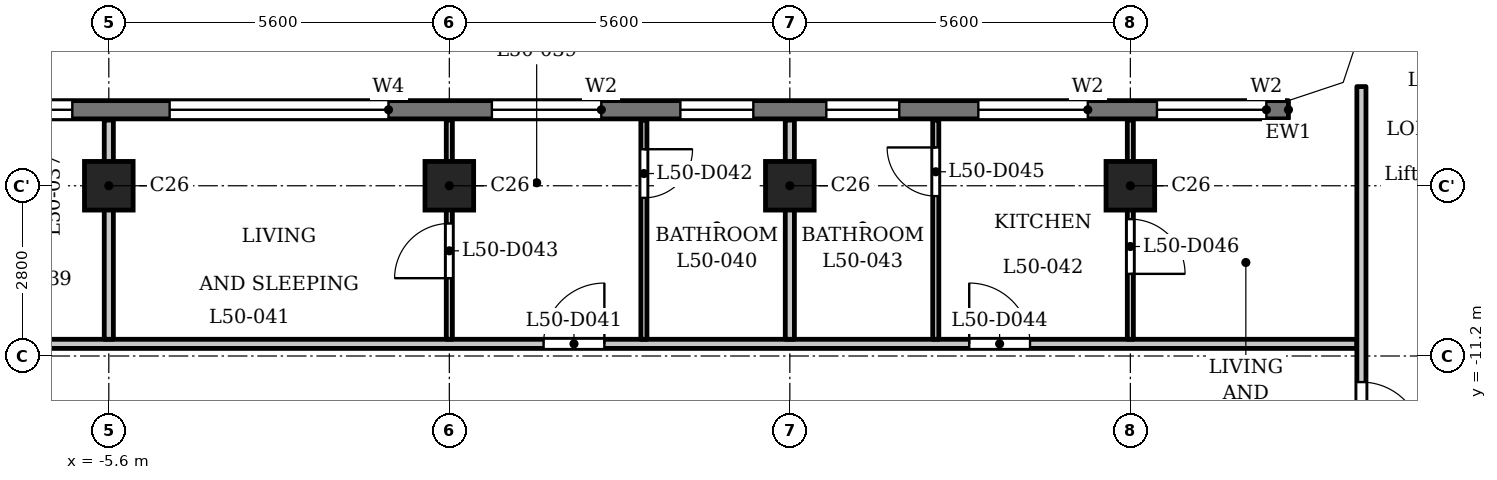
"""IFC4 building model, lengths in metres.
Left out: names, types, materials, properties, quantities, classifications, styles, units other than length and angle.
Written with IfcOpenShell. Run it as: python <this file> out.ifc"""

import sys

from ifc_helpers import new_model, si_unit, direction, frame, frame_2d, origin, origin_2d, place, context, subcontext, project, spatial, polyline, rectangle, outline, extrude, element, fill, save


model = new_model("IFC4")
c1 = context("Model", 3, precision=1e-05, world=origin(), true_north=direction((0.0, 1.0)))
c2 = subcontext(c1, "Body", "Model", "MODEL_VIEW")
j1 = project(units=[si_unit("LENGTHUNIT", "METRE"), si_unit("PLANEANGLEUNIT", "RADIAN")], contexts=[c1])
p1 = place(None, origin())
s1 = spatial("IfcSite", under=j1, at=p1, CompositionType="ELEMENT")
p2 = place(p1, origin())
s2 = spatial("IfcBuilding", under=s1, at=p2, CompositionType="ELEMENT")
p3 = place(p2, frame((0.0, 0.0, 195.9)))
s3 = spatial("IfcBuildingStorey", under=s2, at=p3, CompositionType="ELEMENT", Elevation=195.9)
for number, where, z_axis, x_axis in (
    (1, (-5.6, -8.4, 0.0), (0.0, 0.0, 1.0), (1.0, 0.0, 0.0)),
    (2, (0.0, -8.4, 0.0), (0.0, 0.0, 1.0), (1.0, 0.0, 0.0)),
    (3, (5.6, -8.4, 0.0), (0.0, 0.0, 1.0), (1.0, 0.0, 0.0)),
    (4, (11.2, -8.4, 0.0), (0.0, 0.0, 1.0), (1.0, 0.0, 0.0)),
):
    element("IfcColumn", number, at=place(p3, frame(where, z_axis=z_axis, x_axis=x_axis)), inside=s3, PredefinedType="COLUMN", context=c2, shape_type="SweptSolid", body=[
        extrude(rectangle(XDim=0.8, YDim=0.8, at=origin_2d()), origin(), (0.0, 0.0, 1.0), 3.5),
    ])
p4 = place(p3, frame((13.8, -7.15, 0.0), z_axis=(0.0, 0.0, 1.0), x_axis=(-1.0, 0.0, 0.0)))
e5 = element("IfcWall", 5, at=p4, inside=s3, PredefinedType="SOLIDWALL", context=c2, shape_type="SweptSolid", body=[
    extrude(rectangle(XDim=27.6, YDim=0.3, at=frame_2d((13.8, 0.0))), origin(), (0.0, 0.0, 1.0), 3.2),
])
p5 = place(p4, frame((0.363, 0.0, 0.9)))
e6 = element("IfcOpeningElement", 6, at=p5, cuts=e5, PredefinedType="OPENING", context=c2, shape_type="SweptSolid", body=[
    extrude(rectangle(XDim=1.8, YDim=1.25, at=frame_2d((0.9, 0.625))), frame((0.0, 0.16, 0.0), z_axis=(0.0, -1.0, 0.0), x_axis=(1.0, 0.0, 0.0)), (0.0, 0.0, 1.0), 0.32),
])
p6 = place(p4, frame((3.3, 0.0, 0.9)))
e7 = element("IfcOpeningElement", 7, at=p6, cuts=e5, PredefinedType="OPENING", context=c2, shape_type="SweptSolid", body=[
    extrude(rectangle(XDim=1.8, YDim=1.25, at=frame_2d((0.9, 0.625))), frame((0.0, 0.16, 0.0), z_axis=(0.0, -1.0, 0.0), x_axis=(1.0, 0.0, 0.0)), (0.0, 0.0, 1.0), 0.32),
])
p7 = place(p4, frame((6.4, 0.0, 0.6)))
e8 = element("IfcOpeningElement", 8, at=p7, cuts=e5, PredefinedType="OPENING", context=c2, shape_type="SweptSolid", body=[
    extrude(rectangle(XDim=1.2, YDim=1.55, at=frame_2d((0.6, 0.775))), frame((0.0, 0.16, 0.0), z_axis=(0.0, -1.0, 0.0), x_axis=(1.0, 0.0, 0.0)), (0.0, 0.0, 1.0), 0.32),
])
p8 = place(p4, frame((8.8, 0.0, 0.6)))
e9 = element("IfcOpeningElement", 9, at=p8, cuts=e5, PredefinedType="OPENING", context=c2, shape_type="SweptSolid", body=[
    extrude(rectangle(XDim=1.2, YDim=1.55, at=frame_2d((0.6, 0.775))), frame((0.0, 0.16, 0.0), z_axis=(0.0, -1.0, 0.0), x_axis=(1.0, 0.0, 0.0)), (0.0, 0.0, 1.0), 0.32),
])
p9 = place(p4, frame((11.3, 0.0, 0.9)))
e10 = element("IfcOpeningElement", 10, at=p9, cuts=e5, PredefinedType="OPENING", context=c2, shape_type="SweptSolid", body=[
    extrude(rectangle(XDim=1.8, YDim=1.25, at=frame_2d((0.9, 0.625))), frame((0.0, 0.16, 0.0), z_axis=(0.0, -1.0, 0.0), x_axis=(1.0, 0.0, 0.0)), (0.0, 0.0, 1.0), 0.32),
])
p10 = place(p4, frame((14.8, 0.0, 1.2)))
e11 = element("IfcOpeningElement", 11, at=p10, cuts=e5, PredefinedType="OPENING", context=c2, shape_type="SweptSolid", body=[
    extrude(rectangle(XDim=3.6, YDim=0.95, at=frame_2d((1.8, 0.475))), frame((0.0, 0.16, 0.0), z_axis=(0.0, -1.0, 0.0), x_axis=(1.0, 0.0, 0.0)), (0.0, 0.0, 1.0), 0.32),
])
p11 = place(p4, frame((20.0, 0.0, 0.6)))
e12 = element("IfcOpeningElement", 12, at=p11, cuts=e5, PredefinedType="OPENING", context=c2, shape_type="SweptSolid", body=[
    extrude(rectangle(XDim=1.2, YDim=1.55, at=frame_2d((0.6, 0.775))), frame((0.0, 0.16, 0.0), z_axis=(0.0, -1.0, 0.0), x_axis=(1.0, 0.0, 0.0)), (0.0, 0.0, 1.0), 0.32),
])
p12 = place(p4, frame((22.5, 0.0, 0.9)))
e13 = element("IfcOpeningElement", 13, at=p12, cuts=e5, PredefinedType="OPENING", context=c2, shape_type="SweptSolid", body=[
    extrude(rectangle(XDim=1.8, YDim=1.25, at=frame_2d((0.9, 0.625))), frame((0.0, 0.16, 0.0), z_axis=(0.0, -1.0, 0.0), x_axis=(1.0, 0.0, 0.0)), (0.0, 0.0, 1.0), 0.32),
])
p13 = place(p4, frame((25.438, 0.0, 0.9)))
e14 = element("IfcOpeningElement", 14, at=p13, cuts=e5, PredefinedType="OPENING", context=c2, shape_type="SweptSolid", body=[
    extrude(rectangle(XDim=1.8, YDim=1.25, at=frame_2d((0.9, 0.625))), frame((0.0, 0.16, 0.0), z_axis=(0.0, -1.0, 0.0), x_axis=(1.0, 0.0, 0.0)), (0.0, 0.0, 1.0), 0.32),
])
p14 = place(p3, frame((-14.925, -11.0, 0.0), z_axis=(0.0, 0.0, 1.0), x_axis=(1.0, 0.0, 0.0)))
e15 = element("IfcWall", 15, at=p14, inside=s3, PredefinedType="PARTITIONING", context=c2, shape_type="SweptSolid", body=[
    extrude(rectangle(XDim=29.85, YDim=0.15, at=frame_2d((14.925, 0.0))), origin(), (0.0, 0.0, 1.0), 3.2),
])
p15 = place(p14, frame((4.275, 0.0, 0.0)))
e16 = element("IfcOpeningElement", 16, at=p15, cuts=e15, PredefinedType="OPENING", context=c2, shape_type="SweptSolid", body=[
    extrude(rectangle(XDim=1.0, YDim=2.1, at=frame_2d((0.5, 1.05))), frame((0.0, 0.085, 0.0), z_axis=(0.0, -1.0, 0.0), x_axis=(1.0, 0.0, 0.0)), (0.0, 0.0, 1.0), 0.17),
])
p16 = place(p14, frame((16.475, 0.0, 0.0)))
e17 = element("IfcOpeningElement", 17, at=p16, cuts=e15, PredefinedType="OPENING", context=c2, shape_type="SweptSolid", body=[
    extrude(rectangle(XDim=1.0, YDim=2.1, at=frame_2d((0.5, 1.05))), frame((0.0, 0.085, 0.0), z_axis=(0.0, -1.0, 0.0), x_axis=(1.0, 0.0, 0.0)), (0.0, 0.0, 1.0), 0.17),
])
p17 = place(p14, frame((23.475, 0.0, 0.0)))
e18 = element("IfcOpeningElement", 18, at=p17, cuts=e15, PredefinedType="OPENING", context=c2, shape_type="SweptSolid", body=[
    extrude(rectangle(XDim=1.0, YDim=2.1, at=frame_2d((0.5, 1.05))), frame((0.0, 0.085, 0.0), z_axis=(0.0, -1.0, 0.0), x_axis=(1.0, 0.0, 0.0)), (0.0, 0.0, 1.0), 0.17),
])
p18 = place(p3, frame((-5.6, -10.925, 0.0), z_axis=(0.0, 0.0, 1.0), x_axis=(0.0, 1.0, 0.0)))
e19 = element("IfcWall", 19, at=p18, inside=s3, PredefinedType="PARTITIONING", context=c2, shape_type="SweptSolid", body=[
    extrude(rectangle(XDim=3.605, YDim=0.15, at=frame_2d((1.802, 0.0))), origin(), (0.0, 0.0, 1.0), 3.2),
])
p19 = place(p3, frame((0.0, -10.925, 0.0), z_axis=(0.0, 0.0, 1.0), x_axis=(0.0, 1.0, 0.0)))
e20 = element("IfcWall", 20, at=p19, inside=s3, PredefinedType="PARTITIONING", context=c2, shape_type="SweptSolid", body=[
    extrude(rectangle(XDim=3.605, YDim=0.1, at=frame_2d((1.802, 0.0))), origin(), (0.0, 0.0, 1.0), 3.2),
])
p20 = place(p19, frame((1.005, 0.0, 0.0)))
e21 = element("IfcOpeningElement", 21, at=p20, cuts=e20, PredefinedType="OPENING", context=c2, shape_type="SweptSolid", body=[
    extrude(rectangle(XDim=0.9, YDim=2.1, at=frame_2d((0.45, 1.05))), frame((0.0, 0.06, 0.0), z_axis=(0.0, -1.0, 0.0), x_axis=(1.0, 0.0, 0.0)), (0.0, 0.0, 1.0), 0.12),
])
p21 = place(p3, frame((3.2, -10.925, 0.0), z_axis=(0.0, 0.0, 1.0), x_axis=(0.0, 1.0, 0.0)))
e22 = element("IfcWall", 22, at=p21, inside=s3, PredefinedType="PARTITIONING", context=c2, shape_type="SweptSolid", body=[
    extrude(rectangle(XDim=3.605, YDim=0.1, at=frame_2d((1.802, 0.0))), origin(), (0.0, 0.0, 1.0), 3.2),
])
p22 = place(p21, frame((2.326, 0.0, 0.0)))
e23 = element("IfcOpeningElement", 23, at=p22, cuts=e22, PredefinedType="OPENING", context=c2, shape_type="SweptSolid", body=[
    extrude(rectangle(XDim=0.8, YDim=2.1, at=frame_2d((0.4, 1.05))), frame((0.0, 0.06, 0.0), z_axis=(0.0, -1.0, 0.0), x_axis=(1.0, 0.0, 0.0)), (0.0, 0.0, 1.0), 0.12),
])
p23 = place(p3, frame((5.6, -10.925, 0.0), z_axis=(0.0, 0.0, 1.0), x_axis=(0.0, 1.0, 0.0)))
e24 = element("IfcWall", 24, at=p23, inside=s3, PredefinedType="PARTITIONING", context=c2, shape_type="SweptSolid", body=[
    extrude(rectangle(XDim=3.605, YDim=0.15, at=frame_2d((1.802, 0.0))), origin(), (0.0, 0.0, 1.0), 3.2),
])
p24 = place(p3, frame((8.0, -10.925, 0.0), z_axis=(0.0, 0.0, 1.0), x_axis=(0.0, 1.0, 0.0)))
e25 = element("IfcWall", 25, at=p24, inside=s3, PredefinedType="PARTITIONING", context=c2, shape_type="SweptSolid", body=[
    extrude(rectangle(XDim=3.605, YDim=0.1, at=frame_2d((1.802, 0.0))), origin(), (0.0, 0.0, 1.0), 3.2),
])
p25 = place(p24, frame((2.355, 0.0, 0.0)))
e26 = element("IfcOpeningElement", 26, at=p25, cuts=e25, PredefinedType="OPENING", context=c2, shape_type="SweptSolid", body=[
    extrude(rectangle(XDim=0.8, YDim=2.1, at=frame_2d((0.4, 1.05))), frame((0.0, 0.06, 0.0), z_axis=(0.0, -1.0, 0.0), x_axis=(1.0, 0.0, 0.0)), (0.0, 0.0, 1.0), 0.12),
])
p26 = place(p3, frame((11.2, -10.925, 0.0), z_axis=(0.0, 0.0, 1.0), x_axis=(0.0, 1.0, 0.0)))
e27 = element("IfcWall", 27, at=p26, inside=s3, PredefinedType="PARTITIONING", context=c2, shape_type="SweptSolid", body=[
    extrude(rectangle(XDim=3.605, YDim=0.1, at=frame_2d((1.802, 0.0))), origin(), (0.0, 0.0, 1.0), 3.2),
])
p27 = place(p26, frame((1.076, 0.0, 0.0)))
e28 = element("IfcOpeningElement", 28, at=p27, cuts=e27, PredefinedType="OPENING", context=c2, shape_type="SweptSolid", body=[
    extrude(rectangle(XDim=0.9, YDim=2.1, at=frame_2d((0.45, 1.05))), frame((0.0, 0.06, 0.0), z_axis=(0.0, -1.0, 0.0), x_axis=(1.0, 0.0, 0.0)), (0.0, 0.0, 1.0), 0.12),
])
p28 = place(p3, frame((15.0, -13.125, 0.0), z_axis=(0.0, 0.0, 1.0), x_axis=(0.0, 1.0, 0.0)))
e29 = element("IfcWall", 29, at=p28, inside=s3, PredefinedType="PARTITIONING", context=c2, shape_type="SweptSolid", body=[
    extrude(rectangle(XDim=6.356, YDim=0.15, at=frame_2d((3.178, 0.0))), origin(), (0.0, 0.0, 1.0), 3.2),
])
p29 = place(p28, frame((0.496, 0.0, 0.0)))
e30 = element("IfcOpeningElement", 30, at=p29, cuts=e29, PredefinedType="OPENING", context=c2, shape_type="SweptSolid", body=[
    extrude(rectangle(XDim=1.0, YDim=2.1, at=frame_2d((0.5, 1.05))), frame((0.0, 0.085, 0.0), z_axis=(0.0, -1.0, 0.0), x_axis=(1.0, 0.0, 0.0)), (0.0, 0.0, 1.0), 0.17),
])
p30 = place(p3, origin())
e31 = element("IfcWall", 31, at=p30, inside=s3, PredefinedType="SOLIDWALL", context=c2, shape_type="SweptSolid", body=[
    extrude(outline(polyline([(14.937, -6.937), (15.3, -5.849), (15.3, -5.8), (15.0, -5.8), (14.7, -6.7), (13.8, -7.0), (13.8, -7.3), (13.849, -7.3), (14.937, -6.937)])), origin(), (0.0, 0.0, 1.0), 3.2),
])
p31 = place(p29, origin())
e32 = element("IfcDoor", 32, at=p31, inside=s3, OperationType="SINGLE_SWING_LEFT", PredefinedType="DOOR", context=c2, shape_type="SweptSolid", body=[
    extrude(rectangle(XDim=1.0, YDim=2.1, at=frame_2d((0.5, 1.05))), frame((0.0, 0.025, 0.0), z_axis=(0.0, -1.0, 0.0), x_axis=(1.0, 0.0, 0.0)), (0.0, 0.0, 1.0), 0.05),
])
fill(e30, e32)
p32 = place(p16, origin())
e33 = element("IfcDoor", 33, at=p32, inside=s3, OperationType="SINGLE_SWING_LEFT", PredefinedType="DOOR", context=c2, shape_type="SweptSolid", body=[
    extrude(rectangle(XDim=1.0, YDim=2.1, at=frame_2d((0.5, 1.05))), frame((0.0, 0.025, 0.0), z_axis=(0.0, -1.0, 0.0), x_axis=(1.0, 0.0, 0.0)), (0.0, 0.0, 1.0), 0.05),
])
fill(e17, e33)
p33 = place(p22, origin())
e34 = element("IfcDoor", 34, at=p33, inside=s3, OperationType="SINGLE_SWING_RIGHT", PredefinedType="DOOR", context=c2, shape_type="SweptSolid", body=[
    extrude(rectangle(XDim=0.8, YDim=2.1, at=frame_2d((0.4, 1.05))), frame((0.0, 0.025, 0.0), z_axis=(0.0, -1.0, 0.0), x_axis=(1.0, 0.0, 0.0)), (0.0, 0.0, 1.0), 0.05),
])
fill(e23, e34)
p34 = place(p20, origin())
e35 = element("IfcDoor", 35, at=p34, inside=s3, OperationType="SINGLE_SWING_RIGHT", PredefinedType="DOOR", context=c2, shape_type="SweptSolid", body=[
    extrude(rectangle(XDim=0.9, YDim=2.1, at=frame_2d((0.45, 1.05))), frame((0.0, 0.025, 0.0), z_axis=(0.0, -1.0, 0.0), x_axis=(1.0, 0.0, 0.0)), (0.0, 0.0, 1.0), 0.05),
])
fill(e21, e35)
p35 = place(p17, origin())
e36 = element("IfcDoor", 36, at=p35, inside=s3, OperationType="SINGLE_SWING_RIGHT", PredefinedType="DOOR", context=c2, shape_type="SweptSolid", body=[
    extrude(rectangle(XDim=1.0, YDim=2.1, at=frame_2d((0.5, 1.05))), frame((0.0, 0.025, 0.0), z_axis=(0.0, -1.0, 0.0), x_axis=(1.0, 0.0, 0.0)), (0.0, 0.0, 1.0), 0.05),
])
fill(e18, e36)
p36 = place(p25, origin())
e37 = element("IfcDoor", 37, at=p36, inside=s3, OperationType="SINGLE_SWING_LEFT", PredefinedType="DOOR", context=c2, shape_type="SweptSolid", body=[
    extrude(rectangle(XDim=0.8, YDim=2.1, at=frame_2d((0.4, 1.05))), frame((0.0, 0.025, 0.0), z_axis=(0.0, -1.0, 0.0), x_axis=(1.0, 0.0, 0.0)), (0.0, 0.0, 1.0), 0.05),
])
fill(e26, e37)
p37 = place(p27, origin())
e38 = element("IfcDoor", 38, at=p37, inside=s3, OperationType="SINGLE_SWING_LEFT", PredefinedType="DOOR", context=c2, shape_type="SweptSolid", body=[
    extrude(rectangle(XDim=0.9, YDim=2.1, at=frame_2d((0.45, 1.05))), frame((0.0, 0.025, 0.0), z_axis=(0.0, -1.0, 0.0), x_axis=(1.0, 0.0, 0.0)), (0.0, 0.0, 1.0), 0.05),
])
fill(e28, e38)
p38 = place(p5, origin())
e39 = element("IfcWindow", 39, at=p38, inside=s3, PartitioningType="SINGLE_PANEL", PredefinedType="WINDOW", context=c2, shape_type="SweptSolid", body=[
    extrude(rectangle(XDim=1.8, YDim=1.25, at=frame_2d((0.9, 0.625))), frame((0.0, 0.03, 0.0), z_axis=(0.0, -1.0, 0.0), x_axis=(1.0, 0.0, 0.0)), (0.0, 0.0, 1.0), 0.06),
])
fill(e6, e39)
p39 = place(p6, origin())
e40 = element("IfcWindow", 40, at=p39, inside=s3, PartitioningType="SINGLE_PANEL", PredefinedType="WINDOW", context=c2, shape_type="SweptSolid", body=[
    extrude(rectangle(XDim=1.8, YDim=1.25, at=frame_2d((0.9, 0.625))), frame((0.0, 0.03, 0.0), z_axis=(0.0, -1.0, 0.0), x_axis=(1.0, 0.0, 0.0)), (0.0, 0.0, 1.0), 0.06),
])
fill(e7, e40)
p40 = place(p7, origin())
e41 = element("IfcWindow", 41, at=p40, inside=s3, PartitioningType="SINGLE_PANEL", PredefinedType="WINDOW", context=c2, shape_type="SweptSolid", body=[
    extrude(rectangle(XDim=1.2, YDim=1.55, at=frame_2d((0.6, 0.775))), frame((0.0, 0.03, 0.0), z_axis=(0.0, -1.0, 0.0), x_axis=(1.0, 0.0, 0.0)), (0.0, 0.0, 1.0), 0.06),
])
fill(e8, e41)
p41 = place(p8, origin())
e42 = element("IfcWindow", 42, at=p41, inside=s3, PartitioningType="SINGLE_PANEL", PredefinedType="WINDOW", context=c2, shape_type="SweptSolid", body=[
    extrude(rectangle(XDim=1.2, YDim=1.55, at=frame_2d((0.6, 0.775))), frame((0.0, 0.03, 0.0), z_axis=(0.0, -1.0, 0.0), x_axis=(1.0, 0.0, 0.0)), (0.0, 0.0, 1.0), 0.06),
])
fill(e9, e42)
p42 = place(p9, origin())
e43 = element("IfcWindow", 43, at=p42, inside=s3, PartitioningType="SINGLE_PANEL", PredefinedType="WINDOW", context=c2, shape_type="SweptSolid", body=[
    extrude(rectangle(XDim=1.8, YDim=1.25, at=frame_2d((0.9, 0.625))), frame((0.0, 0.03, 0.0), z_axis=(0.0, -1.0, 0.0), x_axis=(1.0, 0.0, 0.0)), (0.0, 0.0, 1.0), 0.06),
])
fill(e10, e43)
p43 = place(p10, origin())
e44 = element("IfcWindow", 44, at=p43, inside=s3, PartitioningType="SINGLE_PANEL", PredefinedType="WINDOW", context=c2, shape_type="SweptSolid", body=[
    extrude(rectangle(XDim=3.6, YDim=0.95, at=frame_2d((1.8, 0.475))), frame((0.0, 0.03, 0.0), z_axis=(0.0, -1.0, 0.0), x_axis=(1.0, 0.0, 0.0)), (0.0, 0.0, 1.0), 0.06),
])
fill(e11, e44)
p44 = place(p11, origin())
e45 = element("IfcWindow", 45, at=p44, inside=s3, PartitioningType="SINGLE_PANEL", PredefinedType="WINDOW", context=c2, shape_type="SweptSolid", body=[
    extrude(rectangle(XDim=1.2, YDim=1.55, at=frame_2d((0.6, 0.775))), frame((0.0, 0.03, 0.0), z_axis=(0.0, -1.0, 0.0), x_axis=(1.0, 0.0, 0.0)), (0.0, 0.0, 1.0), 0.06),
])
fill(e12, e45)
save(model, sys.argv[1])
